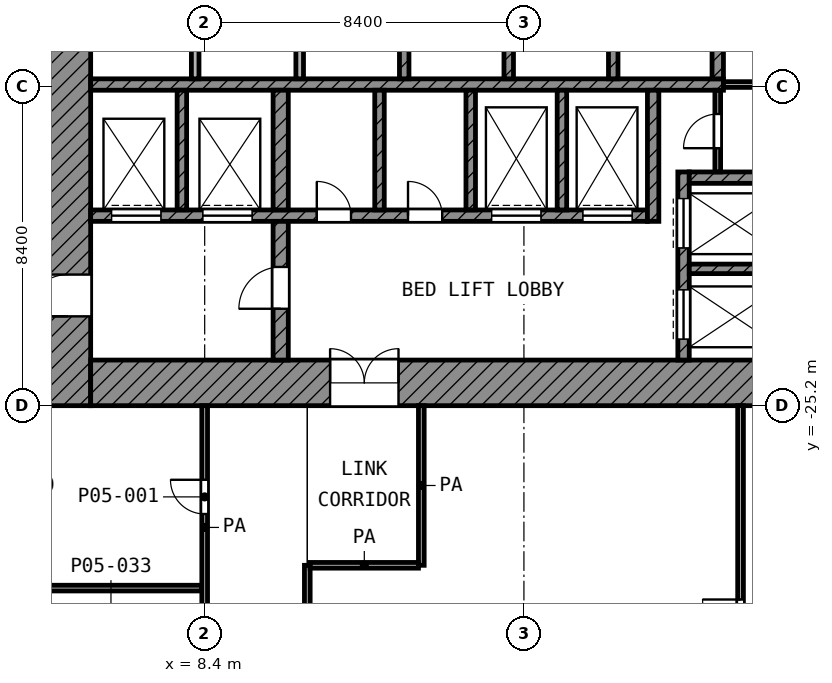
"""IFC4 building model, lengths in metres.
Left out: names, types, materials, properties, quantities, classifications, styles, units other than length and angle.
Written with IfcOpenShell. Run it as: python <this file> out.ifc"""

import sys

from ifc_helpers import new_model, si_unit, direction, frame, frame_2d, origin, place, context, subcontext, project, spatial, rectangle, extrude, element, fill, save


model = new_model("IFC4")
c1 = context("Model", 3, precision=1e-05, world=origin(), true_north=direction((0.0, 1.0)))
c2 = subcontext(c1, "Body", "Model", "MODEL_VIEW")
j1 = project(units=[si_unit("LENGTHUNIT", "METRE"), si_unit("PLANEANGLEUNIT", "RADIAN")], contexts=[c1])
p1 = place(None, origin())
s1 = spatial("IfcSite", under=j1, at=p1, CompositionType="ELEMENT")
p2 = place(p1, origin())
s2 = spatial("IfcBuilding", under=s1, at=p2, CompositionType="ELEMENT")
p3 = place(p2, frame((0.0, 0.0, 23.8)))
s3 = spatial("IfcBuildingStorey", under=s2, at=p3, CompositionType="ELEMENT", Elevation=23.8)
p4 = place(p3, frame((4.8, -25.2, 0.0), z_axis=(0.0, 0.0, 1.0), x_axis=(0.0, 1.0, 0.0)))
e1 = element("IfcWall", 1, at=p4, inside=s3, PredefinedType="SHEAR", context=c2, shape_type="SweptSolid", body=[
    extrude(rectangle(XDim=19.8, YDim=1.2, at=frame_2d((9.9, 0.0))), origin(), (0.0, 0.0, 1.0), 4.85),
])
p5 = place(p4, frame((11.65, 0.0, 0.0)))
e2 = element("IfcOpeningElement", 2, at=p5, cuts=e1, PredefinedType="OPENING", context=c2, shape_type="SweptSolid", body=[
    extrude(rectangle(XDim=1.1, YDim=2.1, at=frame_2d((0.55, 1.05))), frame((0.0, 0.61, 0.0), z_axis=(0.0, -1.0, 0.0), x_axis=(1.0, 0.0, 0.0)), (0.0, 0.0, 1.0), 1.22),
])
p6 = place(p4, frame((2.35, 0.0, 0.0)))
e3 = element("IfcOpeningElement", 3, at=p6, cuts=e1, PredefinedType="OPENING", context=c2, shape_type="SweptSolid", body=[
    extrude(rectangle(XDim=1.1, YDim=2.1, at=frame_2d((0.55, 1.05))), frame((0.0, 0.61, 0.0), z_axis=(0.0, -1.0, 0.0), x_axis=(1.0, 0.0, 0.0)), (0.0, 0.0, 1.0), 1.22),
])
p7 = place(p3, frame((5.4, -24.6, 0.0), z_axis=(0.0, 0.0, 1.0), x_axis=(1.0, 0.0, 0.0)))
e4 = element("IfcWall", 4, at=p7, inside=s3, PredefinedType="SHEAR", context=c2, shape_type="SweptSolid", body=[
    extrude(rectangle(XDim=18.6, YDim=1.2, at=frame_2d((9.3, 0.0))), origin(), (0.0, 0.0, 1.0), 4.85),
])
p8 = place(p7, frame((6.3, 0.0, 0.0)))
e5 = element("IfcOpeningElement", 5, at=p8, cuts=e4, PredefinedType="OPENING", context=c2, shape_type="SweptSolid", body=[
    extrude(rectangle(XDim=1.8, YDim=2.1, at=frame_2d((0.9, 1.05))), frame((0.0, 0.61, 0.0), z_axis=(0.0, -1.0, 0.0), x_axis=(1.0, 0.0, 0.0)), (0.0, 0.0, 1.0), 1.22),
])
p9 = place(p3, frame((5.4, -16.75, 0.0), z_axis=(0.0, 0.0, 1.0), x_axis=(1.0, 0.0, 0.0)))
e6 = element("IfcWall", 6, at=p9, inside=s3, PredefinedType="SHEAR", context=c2, shape_type="SweptSolid", body=[
    extrude(rectangle(XDim=16.65, YDim=0.3, at=frame_2d((8.325, 0.0))), origin(), (0.0, 0.0, 1.0), 4.85),
])
p10 = place(p3, frame((5.4, -20.2, 0.0), z_axis=(0.0, 0.0, 1.0), x_axis=(1.0, 0.0, 0.0)))
e7 = element("IfcWall", 7, at=p10, inside=s3, PredefinedType="SHEAR", context=c2, shape_type="SweptSolid", body=[
    extrude(rectangle(XDim=14.65, YDim=0.3, at=frame_2d((7.325, 0.0))), origin(), (0.0, 0.0, 1.0), 4.85),
])
p11 = place(p10, frame((10.55, 0.0, 0.0)))
e8 = element("IfcOpeningElement", 8, at=p11, cuts=e7, PredefinedType="OPENING", context=c2, shape_type="SweptSolid", body=[
    extrude(rectangle(XDim=1.3, YDim=2.1, at=frame_2d((0.65, 1.05))), frame((0.0, 0.16, 0.0), z_axis=(0.0, -1.0, 0.0), x_axis=(1.0, 0.0, 0.0)), (0.0, 0.0, 1.0), 0.32),
])
p12 = place(p10, frame((12.95, 0.0, 0.0)))
e9 = element("IfcOpeningElement", 9, at=p12, cuts=e7, PredefinedType="OPENING", context=c2, shape_type="SweptSolid", body=[
    extrude(rectangle(XDim=1.3, YDim=2.1, at=frame_2d((0.65, 1.05))), frame((0.0, 0.16, 0.0), z_axis=(0.0, -1.0, 0.0), x_axis=(1.0, 0.0, 0.0)), (0.0, 0.0, 1.0), 0.32),
])
p13 = place(p10, frame((0.55, 0.0, 0.0)))
e10 = element("IfcOpeningElement", 10, at=p13, cuts=e7, PredefinedType="OPENING", context=c2, shape_type="SweptSolid", body=[
    extrude(rectangle(XDim=1.3, YDim=2.1, at=frame_2d((0.65, 1.05))), frame((0.0, 0.16, 0.0), z_axis=(0.0, -1.0, 0.0), x_axis=(1.0, 0.0, 0.0)), (0.0, 0.0, 1.0), 0.32),
])
p14 = place(p10, frame((2.95, 0.0, 0.0)))
e11 = element("IfcOpeningElement", 11, at=p14, cuts=e7, PredefinedType="OPENING", context=c2, shape_type="SweptSolid", body=[
    extrude(rectangle(XDim=1.3, YDim=2.1, at=frame_2d((0.65, 1.05))), frame((0.0, 0.16, 0.0), z_axis=(0.0, -1.0, 0.0), x_axis=(1.0, 0.0, 0.0)), (0.0, 0.0, 1.0), 0.32),
])
p15 = place(p10, frame((5.95, 0.0, 0.0)))
e12 = element("IfcOpeningElement", 12, at=p15, cuts=e7, PredefinedType="OPENING", context=c2, shape_type="SweptSolid", body=[
    extrude(rectangle(XDim=0.9, YDim=2.1, at=frame_2d((0.45, 1.05))), frame((0.0, 0.16, 0.0), z_axis=(0.0, -1.0, 0.0), x_axis=(1.0, 0.0, 0.0)), (0.0, 0.0, 1.0), 0.32),
])
p16 = place(p10, frame((8.35, 0.0, 0.0)))
e13 = element("IfcOpeningElement", 13, at=p16, cuts=e7, PredefinedType="OPENING", context=c2, shape_type="SweptSolid", body=[
    extrude(rectangle(XDim=0.9, YDim=2.1, at=frame_2d((0.45, 1.05))), frame((0.0, 0.16, 0.0), z_axis=(0.0, -1.0, 0.0), x_axis=(1.0, 0.0, 0.0)), (0.0, 0.0, 1.0), 0.32),
])
p17 = place(p3, frame((10.4, -24.0, 0.0), z_axis=(0.0, 0.0, 1.0), x_axis=(0.0, 1.0, 0.0)))
e14 = element("IfcWall", 14, at=p17, inside=s3, PredefinedType="SHEAR", context=c2, shape_type="SweptSolid", body=[
    extrude(rectangle(XDim=3.65, YDim=0.4, at=frame_2d((1.825, 0.0))), origin(), (0.0, 0.0, 1.0), 4.85),
])
p18 = place(p17, frame((1.35, 0.0, 0.0)))
e15 = element("IfcOpeningElement", 15, at=p18, cuts=e14, PredefinedType="OPENING", context=c2, shape_type="SweptSolid", body=[
    extrude(rectangle(XDim=1.1, YDim=2.1, at=frame_2d((0.55, 1.05))), frame((0.0, 0.21, 0.0), z_axis=(0.0, -1.0, 0.0), x_axis=(1.0, 0.0, 0.0)), (0.0, 0.0, 1.0), 0.42),
])
p19 = place(p3, frame((10.4, -20.05, 0.0), z_axis=(0.0, 0.0, 1.0), x_axis=(0.0, 1.0, 0.0)))
e16 = element("IfcWall", 16, at=p19, inside=s3, PredefinedType="SHEAR", context=c2, shape_type="SweptSolid", body=[
    extrude(rectangle(XDim=3.15, YDim=0.4, at=frame_2d((1.575, 0.0))), origin(), (0.0, 0.0, 1.0), 4.85),
])
p20 = place(p3, frame((20.2, -20.35, 0.0), z_axis=(0.0, 0.0, 1.0), x_axis=(0.0, 1.0, 0.0)))
e17 = element("IfcWall", 17, at=p20, inside=s3, PredefinedType="SHEAR", context=c2, shape_type="SweptSolid", body=[
    extrude(rectangle(XDim=3.45, YDim=0.3, at=frame_2d((1.725, 0.0))), origin(), (0.0, 0.0, 1.0), 4.85),
])
p21 = place(p3, frame((21.9, -16.6, 0.0), z_axis=(0.0, 0.0, 1.0), x_axis=(0.0, 1.0, 0.0)))
e18 = element("IfcWall", 18, at=p21, inside=s3, PredefinedType="SHEAR", context=c2, shape_type="SweptSolid", body=[
    extrude(rectangle(XDim=2.35, YDim=0.3, at=frame_2d((1.175, 0.0))), origin(), (0.0, 0.0, 1.0), 4.85),
])
p22 = place(p3, frame((21.15, -19.2, 0.0), z_axis=(0.0, 0.0, 1.0), x_axis=(1.0, 0.0, 0.0)))
e19 = element("IfcWall", 19, at=p22, inside=s3, PredefinedType="SHEAR", context=c2, shape_type="SweptSolid", body=[
    extrude(rectangle(XDim=2.85, YDim=0.3, at=frame_2d((1.425, 0.0))), origin(), (0.0, 0.0, 1.0), 4.85),
])
p23 = place(p3, frame((21.0, -24.0, 0.0), z_axis=(0.0, 0.0, 1.0), x_axis=(0.0, 1.0, 0.0)))
e20 = element("IfcWall", 20, at=p23, inside=s3, PredefinedType="SHEAR", context=c2, shape_type="SweptSolid", body=[
    extrude(rectangle(XDim=4.95, YDim=0.3, at=frame_2d((2.475, 0.0))), origin(), (0.0, 0.0, 1.0), 4.85),
])
p24 = place(p23, frame((2.95, 0.0, 0.0)))
e21 = element("IfcOpeningElement", 21, at=p24, cuts=e20, PredefinedType="OPENING", context=c2, shape_type="SweptSolid", body=[
    extrude(rectangle(XDim=1.3, YDim=2.1, at=frame_2d((0.65, 1.05))), frame((0.0, 0.16, 0.0), z_axis=(0.0, -1.0, 0.0), x_axis=(1.0, 0.0, 0.0)), (0.0, 0.0, 1.0), 0.32),
])
p25 = place(p23, frame((0.55, 0.0, 0.0)))
e22 = element("IfcOpeningElement", 22, at=p25, cuts=e20, PredefinedType="OPENING", context=c2, shape_type="SweptSolid", body=[
    extrude(rectangle(XDim=1.3, YDim=2.1, at=frame_2d((0.65, 1.05))), frame((0.0, 0.16, 0.0), z_axis=(0.0, -1.0, 0.0), x_axis=(1.0, 0.0, 0.0)), (0.0, 0.0, 1.0), 0.32),
])
p26 = place(p3, frame((21.15, -21.6, 0.0), z_axis=(0.0, 0.0, 1.0), x_axis=(1.0, 0.0, 0.0)))
e23 = element("IfcWall", 23, at=p26, inside=s3, PredefinedType="SHEAR", context=c2, shape_type="SweptSolid", body=[
    extrude(rectangle(XDim=2.85, YDim=0.25, at=frame_2d((1.425, 0.0))), origin(), (0.0, 0.0, 1.0), 4.85),
])
for number, where, z_axis, x_axis in (
    (24, (7.8, -20.05, 0.0), (0.0, 0.0, 1.0), (0.0, 1.0, 0.0)),
    (25, (13.0, -20.05, 0.0), (0.0, 0.0, 1.0), (0.0, 1.0, 0.0)),
    (26, (15.4, -20.05, 0.0), (0.0, 0.0, 1.0), (0.0, 1.0, 0.0)),
    (27, (17.8, -20.05, 0.0), (0.0, 0.0, 1.0), (0.0, 1.0, 0.0)),
):
    element("IfcWall", number, at=place(p3, frame(where, z_axis=z_axis, x_axis=x_axis)), inside=s3, PredefinedType="SHEAR", context=c2, shape_type="SweptSolid", body=[
        extrude(rectangle(XDim=3.15, YDim=0.25, at=frame_2d((1.575, 0.0))), origin(), (0.0, 0.0, 1.0), 4.85),
    ])
for number, where, z_axis, x_axis in (
    (28, (8.15, -16.6, 0.0), (0.0, 0.0, 1.0), (0.0, 1.0, 0.0)),
    (29, (10.9, -16.6, 0.0), (0.0, 0.0, 1.0), (0.0, 1.0, 0.0)),
):
    element("IfcWall", number, at=place(p3, frame(where, z_axis=z_axis, x_axis=x_axis)), inside=s3, PredefinedType="PARTITIONING", context=c2, shape_type="SweptSolid", body=[
        extrude(rectangle(XDim=2.35, YDim=0.2, at=frame_2d((1.175, 0.0))), origin(), (0.0, 0.0, 1.0), 4.85),
    ])
for number, where, z_axis, x_axis in (
    (30, (13.65, -16.6, 0.0), (0.0, 0.0, 1.0), (0.0, 1.0, 0.0)),
    (31, (16.4, -16.6, 0.0), (0.0, 0.0, 1.0), (0.0, 1.0, 0.0)),
    (32, (19.15, -16.6, 0.0), (0.0, 0.0, 1.0), (0.0, 1.0, 0.0)),
):
    element("IfcWall", number, at=place(p3, frame(where, z_axis=z_axis, x_axis=x_axis)), inside=s3, PredefinedType="SHEAR", context=c2, shape_type="SweptSolid", body=[
        extrude(rectangle(XDim=2.35, YDim=0.25, at=frame_2d((1.175, 0.0))), origin(), (0.0, 0.0, 1.0), 4.85),
    ])
p27 = place(p3, frame((21.9, -19.05, 0.0), z_axis=(0.0, 0.0, 1.0), x_axis=(0.0, 1.0, 0.0)))
e33 = element("IfcWall", 33, at=p27, inside=s3, PredefinedType="PARTITIONING", context=c2, shape_type="SweptSolid", body=[
    extrude(rectangle(XDim=2.15, YDim=0.15, at=frame_2d((1.075, 0.0))), origin(), (0.0, 0.0, 1.0), 4.85),
])
p28 = place(p27, frame((0.625, 0.0, 0.0)))
e34 = element("IfcOpeningElement", 34, at=p28, cuts=e33, PredefinedType="OPENING", context=c2, shape_type="SweptSolid", body=[
    extrude(rectangle(XDim=0.9, YDim=2.1, at=frame_2d((0.45, 1.05))), frame((0.0, 0.085, 0.0), z_axis=(0.0, -1.0, 0.0), x_axis=(1.0, 0.0, 0.0)), (0.0, 0.0, 1.0), 0.17),
])
p29 = place(p3, frame((22.05, -16.75, 0.0), z_axis=(0.0, 0.0, 1.0), x_axis=(1.0, 0.0, 0.0)))
e35 = element("IfcWall", 35, at=p29, inside=s3, PredefinedType="PARTITIONING", context=c2, shape_type="SweptSolid", body=[
    extrude(rectangle(XDim=1.95, YDim=0.15, at=frame_2d((0.975, 0.0))), origin(), (0.0, 0.0, 1.0), 4.85),
])
p30 = place(p3, frame((0.002, -30.0, 0.0), z_axis=(0.0, 0.0, 1.0), x_axis=(1.0, 0.0, 0.0)))
e36 = element("IfcWall", 36, at=p30, inside=s3, PredefinedType="PARTITIONING", context=c2, shape_type="SweptSolid", body=[
    extrude(rectangle(XDim=8.323, YDim=0.15, at=frame_2d((4.162, 0.0))), origin(), (0.0, 0.0, 1.0), 3.45),
])
p31 = place(p3, frame((11.175, -29.4, 0.0), z_axis=(0.0, 0.0, 1.0), x_axis=(1.0, 0.0, 0.0)))
e37 = element("IfcWall", 37, at=p31, inside=s3, PredefinedType="PARTITIONING", context=c2, shape_type="SweptSolid", body=[
    extrude(rectangle(XDim=2.85, YDim=0.15, at=frame_2d((1.425, 0.0))), origin(), (0.0, 0.0, 1.0), 4.85),
])
p32 = place(p3, frame((8.4, -31.607, 0.0), z_axis=(0.0, 0.0, 1.0), x_axis=(0.0, 1.0, 0.0)))
e38 = element("IfcWall", 38, at=p32, inside=s3, PredefinedType="PARTITIONING", context=c2, shape_type="SweptSolid", body=[
    extrude(rectangle(XDim=6.407, YDim=0.15, at=frame_2d((3.204, 0.0))), origin(), (0.0, 0.0, 1.0), 4.85),
])
p33 = place(p32, frame((3.557, 0.0, 0.0)))
e39 = element("IfcOpeningElement", 39, at=p33, cuts=e38, PredefinedType="OPENING", context=c2, shape_type="SweptSolid", body=[
    extrude(rectangle(XDim=0.9, YDim=2.1, at=frame_2d((0.45, 1.05))), frame((0.0, 0.085, 0.0), z_axis=(0.0, -1.0, 0.0), x_axis=(1.0, 0.0, 0.0)), (0.0, 0.0, 1.0), 0.17),
])
p34 = place(p3, frame((11.1, -75.5, 0.0), z_axis=(0.0, 0.0, 1.0), x_axis=(0.0, 1.0, 0.0)))
e40 = element("IfcWall", 40, at=p34, inside=s3, PredefinedType="PARTITIONING", context=c2, shape_type="SweptSolid", body=[
    extrude(rectangle(XDim=46.1, YDim=0.15, at=frame_2d((23.05, 0.0))), origin(), (0.0, 0.0, 1.0), 4.85),
])
p35 = place(p34, frame((30.2, 0.0, 0.0)))
e41 = element("IfcOpeningElement", 41, at=p35, cuts=e40, PredefinedType="OPENING", context=c2, shape_type="SweptSolid", body=[
    extrude(rectangle(XDim=1.0, YDim=2.1, at=frame_2d((0.5, 1.05))), frame((0.0, 0.085, 0.0), z_axis=(0.0, -1.0, 0.0), x_axis=(1.0, 0.0, 0.0)), (0.0, 0.0, 1.0), 0.17),
])
p36 = place(p34, frame((27.4, 0.0, 0.0)))
e42 = element("IfcOpeningElement", 42, at=p36, cuts=e40, PredefinedType="OPENING", context=c2, shape_type="SweptSolid", body=[
    extrude(rectangle(XDim=1.0, YDim=2.1, at=frame_2d((0.5, 1.05))), frame((0.0, 0.085, 0.0), z_axis=(0.0, -1.0, 0.0), x_axis=(1.0, 0.0, 0.0)), (0.0, 0.0, 1.0), 0.17),
])
p37 = place(p34, frame((21.8, 0.0, 0.0)))
e43 = element("IfcOpeningElement", 43, at=p37, cuts=e40, PredefinedType="OPENING", context=c2, shape_type="SweptSolid", body=[
    extrude(rectangle(XDim=1.0, YDim=2.1, at=frame_2d((0.5, 1.05))), frame((0.0, 0.085, 0.0), z_axis=(0.0, -1.0, 0.0), x_axis=(1.0, 0.0, 0.0)), (0.0, 0.0, 1.0), 0.17),
])
p38 = place(p34, frame((19.0, 0.0, 0.0)))
e44 = element("IfcOpeningElement", 44, at=p38, cuts=e40, PredefinedType="OPENING", context=c2, shape_type="SweptSolid", body=[
    extrude(rectangle(XDim=1.0, YDim=2.1, at=frame_2d((0.5, 1.05))), frame((0.0, 0.085, 0.0), z_axis=(0.0, -1.0, 0.0), x_axis=(1.0, 0.0, 0.0)), (0.0, 0.0, 1.0), 0.17),
])
p39 = place(p34, frame((5.0, 0.0, 0.0)))
e45 = element("IfcOpeningElement", 45, at=p39, cuts=e40, PredefinedType="OPENING", context=c2, shape_type="SweptSolid", body=[
    extrude(rectangle(XDim=1.0, YDim=2.1, at=frame_2d((0.5, 1.05))), frame((0.0, 0.085, 0.0), z_axis=(0.0, -1.0, 0.0), x_axis=(1.0, 0.0, 0.0)), (0.0, 0.0, 1.0), 0.17),
])
p40 = place(p34, frame((2.2, 0.0, 0.0)))
e46 = element("IfcOpeningElement", 46, at=p40, cuts=e40, PredefinedType="OPENING", context=c2, shape_type="SweptSolid", body=[
    extrude(rectangle(XDim=1.0, YDim=2.1, at=frame_2d((0.5, 1.05))), frame((0.0, 0.085, 0.0), z_axis=(0.0, -1.0, 0.0), x_axis=(1.0, 0.0, 0.0)), (0.0, 0.0, 1.0), 0.17),
])
p41 = place(p3, frame((14.1, -29.4, 0.0), z_axis=(0.0, 0.0, 1.0), x_axis=(0.0, 1.0, 0.0)))
e47 = element("IfcWall", 47, at=p41, inside=s3, PredefinedType="PARTITIONING", context=c2, shape_type="SweptSolid", body=[
    extrude(rectangle(XDim=4.2, YDim=0.15, at=frame_2d((2.1, 0.0))), origin(), (0.0, 0.0, 1.0), 4.85),
])
p42 = place(p3, frame((22.5, -75.5, 0.0), z_axis=(0.0, 0.0, 1.0), x_axis=(0.0, 1.0, 0.0)))
e48 = element("IfcWall", 48, at=p42, inside=s3, PredefinedType="PARTITIONING", context=c2, shape_type="SweptSolid", body=[
    extrude(rectangle(XDim=50.3, YDim=0.15, at=frame_2d((25.15, 0.0))), origin(), (0.0, 0.0, 1.0), 4.85),
])
p43 = place(p42, frame((38.6, 0.0, 0.0)))
e49 = element("IfcOpeningElement", 49, at=p43, cuts=e48, PredefinedType="OPENING", context=c2, shape_type="SweptSolid", body=[
    extrude(rectangle(XDim=1.0, YDim=2.1, at=frame_2d((0.5, 1.05))), frame((0.0, 0.085, 0.0), z_axis=(0.0, -1.0, 0.0), x_axis=(1.0, 0.0, 0.0)), (0.0, 0.0, 1.0), 0.17),
])
p44 = place(p42, frame((44.2, 0.0, 0.0)))
e50 = element("IfcOpeningElement", 50, at=p44, cuts=e48, PredefinedType="OPENING", context=c2, shape_type="SweptSolid", body=[
    extrude(rectangle(XDim=1.0, YDim=2.1, at=frame_2d((0.5, 1.05))), frame((0.0, 0.085, 0.0), z_axis=(0.0, -1.0, 0.0), x_axis=(1.0, 0.0, 0.0)), (0.0, 0.0, 1.0), 0.17),
])
p45 = place(p42, frame((10.6, 0.0, 0.0)))
e51 = element("IfcOpeningElement", 51, at=p45, cuts=e48, PredefinedType="OPENING", context=c2, shape_type="SweptSolid", body=[
    extrude(rectangle(XDim=1.0, YDim=2.1, at=frame_2d((0.5, 1.05))), frame((0.0, 0.085, 0.0), z_axis=(0.0, -1.0, 0.0), x_axis=(1.0, 0.0, 0.0)), (0.0, 0.0, 1.0), 0.17),
])
p46 = place(p42, frame((13.4, 0.0, 0.0)))
e52 = element("IfcOpeningElement", 52, at=p46, cuts=e48, PredefinedType="OPENING", context=c2, shape_type="SweptSolid", body=[
    extrude(rectangle(XDim=1.0, YDim=2.1, at=frame_2d((0.5, 1.05))), frame((0.0, 0.085, 0.0), z_axis=(0.0, -1.0, 0.0), x_axis=(1.0, 0.0, 0.0)), (0.0, 0.0, 1.0), 0.17),
])
p47 = place(p24, origin())
e53 = element("IfcDoor", 53, at=p47, inside=s3, OperationType="DOUBLE_DOOR_SLIDING", PredefinedType="DOOR", context=c2, shape_type="SweptSolid", body=[
    extrude(rectangle(XDim=1.3, YDim=2.1, at=frame_2d((0.65, 1.05))), frame((0.0, 0.025, 0.0), z_axis=(0.0, -1.0, 0.0), x_axis=(1.0, 0.0, 0.0)), (0.0, 0.0, 1.0), 0.05),
])
fill(e21, e53)
p48 = place(p25, origin())
e54 = element("IfcDoor", 54, at=p48, inside=s3, OperationType="DOUBLE_DOOR_SLIDING", PredefinedType="DOOR", context=c2, shape_type="SweptSolid", body=[
    extrude(rectangle(XDim=1.3, YDim=2.1, at=frame_2d((0.65, 1.05))), frame((0.0, 0.025, 0.0), z_axis=(0.0, -1.0, 0.0), x_axis=(1.0, 0.0, 0.0)), (0.0, 0.0, 1.0), 0.05),
])
fill(e22, e54)
p49 = place(p11, origin())
e55 = element("IfcDoor", 55, at=p49, inside=s3, OperationType="DOUBLE_DOOR_SLIDING", PredefinedType="DOOR", context=c2, shape_type="SweptSolid", body=[
    extrude(rectangle(XDim=1.3, YDim=2.1, at=frame_2d((0.65, 1.05))), frame((0.0, 0.025, 0.0), z_axis=(0.0, -1.0, 0.0), x_axis=(1.0, 0.0, 0.0)), (0.0, 0.0, 1.0), 0.05),
])
fill(e8, e55)
p50 = place(p12, origin())
e56 = element("IfcDoor", 56, at=p50, inside=s3, OperationType="DOUBLE_DOOR_SLIDING", PredefinedType="DOOR", context=c2, shape_type="SweptSolid", body=[
    extrude(rectangle(XDim=1.3, YDim=2.1, at=frame_2d((0.65, 1.05))), frame((0.0, 0.025, 0.0), z_axis=(0.0, -1.0, 0.0), x_axis=(1.0, 0.0, 0.0)), (0.0, 0.0, 1.0), 0.05),
])
fill(e9, e56)
p51 = place(p13, origin())
e57 = element("IfcDoor", 57, at=p51, inside=s3, OperationType="DOUBLE_DOOR_SLIDING", PredefinedType="DOOR", context=c2, shape_type="SweptSolid", body=[
    extrude(rectangle(XDim=1.3, YDim=2.1, at=frame_2d((0.65, 1.05))), frame((0.0, 0.025, 0.0), z_axis=(0.0, -1.0, 0.0), x_axis=(1.0, 0.0, 0.0)), (0.0, 0.0, 1.0), 0.05),
])
fill(e10, e57)
p52 = place(p14, origin())
e58 = element("IfcDoor", 58, at=p52, inside=s3, OperationType="DOUBLE_DOOR_SLIDING", PredefinedType="DOOR", context=c2, shape_type="SweptSolid", body=[
    extrude(rectangle(XDim=1.3, YDim=2.1, at=frame_2d((0.65, 1.05))), frame((0.0, 0.025, 0.0), z_axis=(0.0, -1.0, 0.0), x_axis=(1.0, 0.0, 0.0)), (0.0, 0.0, 1.0), 0.05),
])
fill(e11, e58)
p53 = place(p6, origin())
e59 = element("IfcDoor", 59, at=p53, inside=s3, OperationType="SINGLE_SWING_LEFT", PredefinedType="DOOR", context=c2, shape_type="SweptSolid", body=[
    extrude(rectangle(XDim=1.1, YDim=2.1, at=frame_2d((0.55, 1.05))), frame((0.0, 0.025, 0.0), z_axis=(0.0, -1.0, 0.0), x_axis=(1.0, 0.0, 0.0)), (0.0, 0.0, 1.0), 0.05),
])
fill(e3, e59)
p54 = place(p18, origin())
e60 = element("IfcDoor", 60, at=p54, inside=s3, OperationType="SINGLE_SWING_LEFT", PredefinedType="DOOR", context=c2, shape_type="SweptSolid", body=[
    extrude(rectangle(XDim=1.1, YDim=2.1, at=frame_2d((0.55, 1.05))), frame((0.0, 0.025, 0.0), z_axis=(0.0, -1.0, 0.0), x_axis=(1.0, 0.0, 0.0)), (0.0, 0.0, 1.0), 0.05),
])
fill(e15, e60)
p55 = place(p8, origin())
e61 = element("IfcDoor", 61, at=p55, inside=s3, OperationType="DOUBLE_DOOR_SINGLE_SWING", PredefinedType="DOOR", context=c2, shape_type="SweptSolid", body=[
    extrude(rectangle(XDim=1.8, YDim=2.1, at=frame_2d((0.9, 1.05))), frame((0.0, 0.025, 0.0), z_axis=(0.0, -1.0, 0.0), x_axis=(1.0, 0.0, 0.0)), (0.0, 0.0, 1.0), 0.05),
])
fill(e5, e61)
p56 = place(p28, origin())
e62 = element("IfcDoor", 62, at=p56, inside=s3, OperationType="SINGLE_SWING_LEFT", PredefinedType="DOOR", context=c2, shape_type="SweptSolid", body=[
    extrude(rectangle(XDim=0.9, YDim=2.1, at=frame_2d((0.45, 1.05))), frame((0.0, 0.025, 0.0), z_axis=(0.0, -1.0, 0.0), x_axis=(1.0, 0.0, 0.0)), (0.0, 0.0, 1.0), 0.05),
])
fill(e34, e62)
p57 = place(p15, origin())
e63 = element("IfcDoor", 63, at=p57, inside=s3, OperationType="SINGLE_SWING_LEFT", PredefinedType="DOOR", context=c2, shape_type="SweptSolid", body=[
    extrude(rectangle(XDim=0.9, YDim=2.1, at=frame_2d((0.45, 1.05))), frame((0.0, 0.025, 0.0), z_axis=(0.0, -1.0, 0.0), x_axis=(1.0, 0.0, 0.0)), (0.0, 0.0, 1.0), 0.05),
])
fill(e12, e63)
p58 = place(p16, origin())
e64 = element("IfcDoor", 64, at=p58, inside=s3, OperationType="SINGLE_SWING_LEFT", PredefinedType="DOOR", context=c2, shape_type="SweptSolid", body=[
    extrude(rectangle(XDim=0.9, YDim=2.1, at=frame_2d((0.45, 1.05))), frame((0.0, 0.025, 0.0), z_axis=(0.0, -1.0, 0.0), x_axis=(1.0, 0.0, 0.0)), (0.0, 0.0, 1.0), 0.05),
])
fill(e13, e64)
p59 = place(p33, origin())
e65 = element("IfcDoor", 65, at=p59, inside=s3, OperationType="SINGLE_SWING_RIGHT", PredefinedType="DOOR", context=c2, shape_type="SweptSolid", body=[
    extrude(rectangle(XDim=0.9, YDim=2.1, at=frame_2d((0.45, 1.05))), frame((0.0, 0.025, 0.0), z_axis=(0.0, -1.0, 0.0), x_axis=(1.0, 0.0, 0.0)), (0.0, 0.0, 1.0), 0.05),
])
fill(e39, e65)
p60 = place(p44, origin())
e66 = element("IfcDoor", 66, at=p60, inside=s3, OperationType="SINGLE_SWING_RIGHT", PredefinedType="DOOR", context=c2, shape_type="SweptSolid", body=[
    extrude(rectangle(XDim=1.0, YDim=2.1, at=frame_2d((0.5, 1.05))), frame((0.0, 0.025, 0.0), z_axis=(0.0, -1.0, 0.0), x_axis=(1.0, 0.0, 0.0)), (0.0, 0.0, 1.0), 0.05),
])
fill(e50, e66)
save(model, sys.argv[1])
